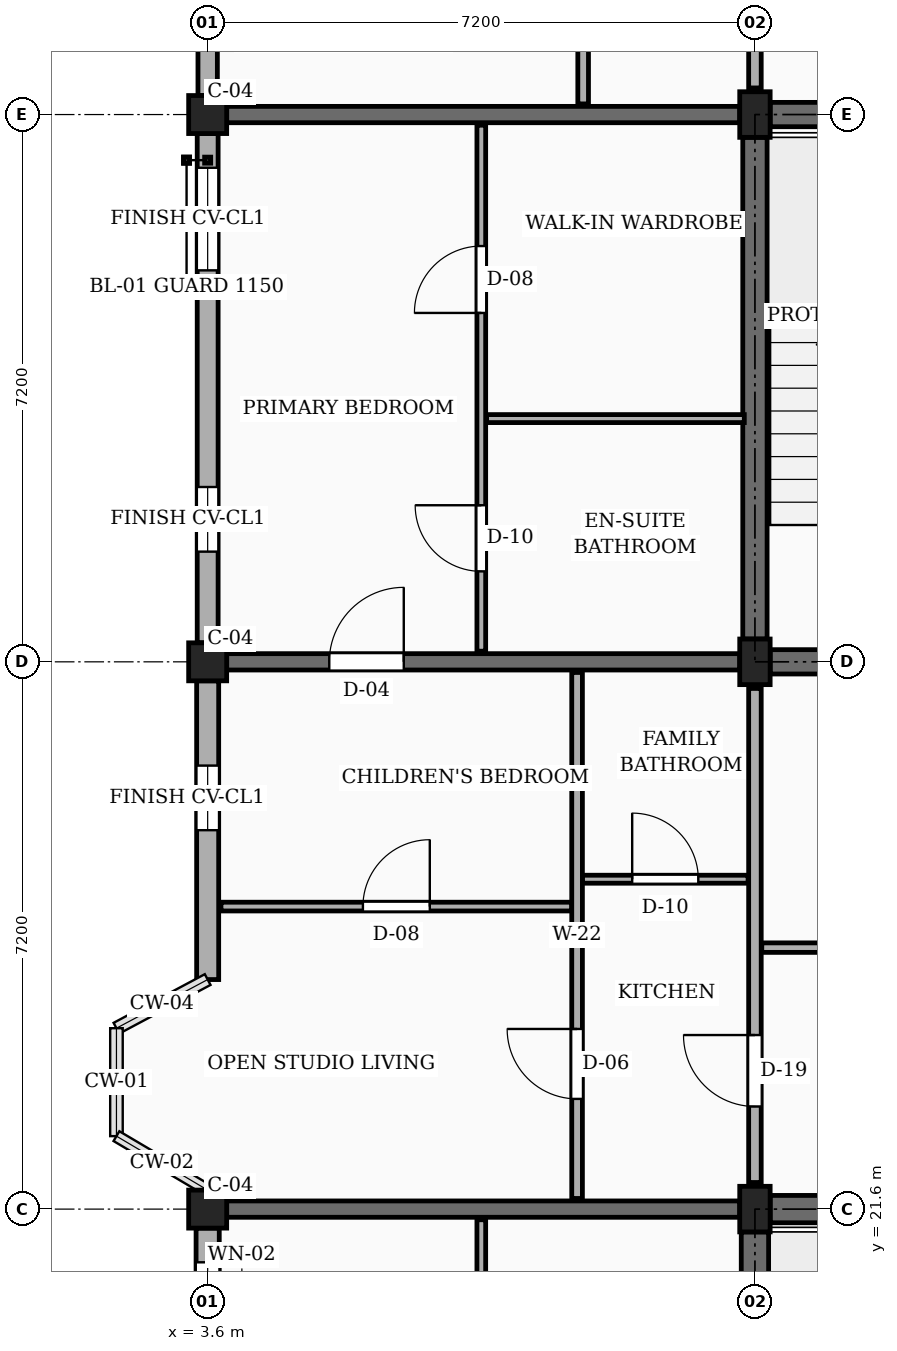
"""IFC4 building model, lengths in metres.
Left out: names, types, materials, properties, quantities, classifications, styles, units other than length and angle.
Written with IfcOpenShell. Run it as: python <this file> out.ifc"""

import sys

from ifc_helpers import new_model, si_unit, direction, frame, frame_2d, origin, origin_2d, place, context, subcontext, project, spatial, rectangle, extrude, element, fill, save


model = new_model("IFC4")
c1 = context("Model", 3, precision=1e-05, world=origin(), true_north=direction((0.0, 1.0)))
c2 = subcontext(c1, "Body", "Model", "MODEL_VIEW")
j1 = project(units=[si_unit("LENGTHUNIT", "METRE"), si_unit("PLANEANGLEUNIT", "RADIAN")], contexts=[c1])
p1 = place(None, origin())
s1 = spatial("IfcSite", under=j1, at=p1, CompositionType="ELEMENT")
p2 = place(p1, origin())
s2 = spatial("IfcBuilding", under=s1, at=p2, CompositionType="ELEMENT")
p3 = place(p2, frame((0.0, 0.0, 26.55)))
s3 = spatial("IfcBuildingStorey", under=s2, at=p3, CompositionType="ELEMENT", Elevation=26.55)
for number, where, z_axis, x_axis in (
    (1, (3.6, 21.6, 0.0), (0.0, 0.0, 1.0), (1.0, 0.0, 0.0)),
    (2, (3.6, 28.8, 0.0), (0.0, 0.0, 1.0), (1.0, 0.0, 0.0)),
    (3, (3.6, 36.0, 0.0), (0.0, 0.0, 1.0), (1.0, 0.0, 0.0)),
):
    element("IfcColumn", number, at=place(p3, frame(where, z_axis=z_axis, x_axis=x_axis)), inside=s3, PredefinedType="COLUMN", context=c2, shape_type="SweptSolid", body=[
        extrude(rectangle(XDim=0.5, YDim=0.5, at=origin_2d()), origin(), (0.0, 0.0, 1.0), 3.15),
    ])
for number, where, z_axis, x_axis in (
    (4, (10.8, 21.6, 0.0), (0.0, 0.0, 1.0), (1.0, 0.0, 0.0)),
    (5, (10.8, 28.8, 0.0), (0.0, 0.0, 1.0), (1.0, 0.0, 0.0)),
    (6, (10.8, 36.0, 0.0), (0.0, 0.0, 1.0), (1.0, 0.0, 0.0)),
):
    element("IfcColumn", number, at=place(p3, frame(where, z_axis=z_axis, x_axis=x_axis)), inside=s3, PredefinedType="COLUMN", context=c2, shape_type="SweptSolid", body=[
        extrude(rectangle(XDim=0.4, YDim=0.6, at=origin_2d()), origin(), (0.0, 0.0, 1.0), 3.15),
    ])
p4 = place(p3, frame((3.85, 21.6, 0.0), z_axis=(0.0, 0.0, 1.0), x_axis=(1.0, 0.0, 0.0)))
e7 = element("IfcWall", 7, at=p4, inside=s3, PredefinedType="SOLIDWALL", context=c2, shape_type="SweptSolid", body=[
    extrude(rectangle(XDim=6.75, YDim=0.215, at=frame_2d((3.375, 0.0))), origin(), (0.0, 0.0, 1.0), 2.17),
])
p5 = place(p3, frame((3.85, 28.8, 0.0), z_axis=(0.0, 0.0, 1.0), x_axis=(1.0, 0.0, 0.0)))
e8 = element("IfcWall", 8, at=p5, inside=s3, PredefinedType="SOLIDWALL", context=c2, shape_type="SweptSolid", body=[
    extrude(rectangle(XDim=6.75, YDim=0.215, at=frame_2d((3.375, 0.0))), origin(), (0.0, 0.0, 1.0), 2.17),
])
p6 = place(p5, frame((1.35, 0.0, 0.0)))
e9 = element("IfcOpeningElement", 9, at=p6, cuts=e8, PredefinedType="OPENING", context=c2, shape_type="SweptSolid", body=[
    extrude(rectangle(XDim=0.98, YDim=2.12, at=frame_2d((0.49, 1.06))), frame((0.0, 0.118, 0.0), z_axis=(0.0, -1.0, 0.0), x_axis=(1.0, 0.0, 0.0)), (0.0, 0.0, 1.0), 0.235),
])
p7 = place(p3, frame((3.85, 36.0, 0.0), z_axis=(0.0, 0.0, 1.0), x_axis=(1.0, 0.0, 0.0)))
e10 = element("IfcWall", 10, at=p7, inside=s3, PredefinedType="SOLIDWALL", context=c2, shape_type="SweptSolid", body=[
    extrude(rectangle(XDim=6.75, YDim=0.215, at=frame_2d((3.375, 0.0))), origin(), (0.0, 0.0, 1.0), 2.17),
])
p8 = place(p3, frame((3.6, 42.95, 0.0), z_axis=(0.0, 0.0, 1.0), x_axis=(0.0, -1.0, 0.0)))
e11 = element("IfcWall", 11, at=p8, inside=s3, PredefinedType="SOLIDWALL", context=c2, shape_type="SweptSolid", body=[
    extrude(rectangle(XDim=6.7, YDim=0.255, at=frame_2d((3.35, 0.0))), origin(), (0.0, 0.0, 1.0), 2.44),
])
p9 = place(p8, frame((0.45, 0.0, 0.78)))
e12 = element("IfcOpeningElement", 12, at=p9, cuts=e11, PredefinedType="OPENING", context=c2, shape_type="SweptSolid", body=[
    extrude(rectangle(XDim=1.15, YDim=1.44, at=frame_2d((0.575, 0.72))), frame((0.0, 0.137, 0.0), z_axis=(0.0, -1.0, 0.0), x_axis=(1.0, 0.0, 0.0)), (0.0, 0.0, 1.0), 0.275),
])
p10 = place(p8, frame((4.65, 0.0, 0.78)))
e13 = element("IfcOpeningElement", 13, at=p10, cuts=e11, PredefinedType="OPENING", context=c2, shape_type="SweptSolid", body=[
    extrude(rectangle(XDim=1.35, YDim=1.44, at=frame_2d((0.675, 0.72))), frame((0.0, 0.137, 0.0), z_axis=(0.0, -1.0, 0.0), x_axis=(1.0, 0.0, 0.0)), (0.0, 0.0, 1.0), 0.275),
])
p11 = place(p3, frame((3.6, 35.75, 0.0), z_axis=(0.0, 0.0, 1.0), x_axis=(0.0, -1.0, 0.0)))
e14 = element("IfcWall", 14, at=p11, inside=s3, PredefinedType="SOLIDWALL", context=c2, shape_type="SweptSolid", body=[
    extrude(rectangle(XDim=6.7, YDim=0.275, at=frame_2d((3.35, 0.0))), origin(), (0.0, 0.0, 1.0), 2.44),
])
p12 = place(p11, frame((0.45, 0.0, 0.78)))
e15 = element("IfcOpeningElement", 15, at=p12, cuts=e14, PredefinedType="OPENING", context=c2, shape_type="SweptSolid", body=[
    extrude(rectangle(XDim=1.35, YDim=1.44, at=frame_2d((0.675, 0.72))), frame((0.0, 0.147, 0.0), z_axis=(0.0, -1.0, 0.0), x_axis=(1.0, 0.0, 0.0)), (0.0, 0.0, 1.0), 0.295),
])
p13 = place(p11, frame((4.65, 0.0, 0.78)))
e16 = element("IfcOpeningElement", 16, at=p13, cuts=e14, PredefinedType="OPENING", context=c2, shape_type="SweptSolid", body=[
    extrude(rectangle(XDim=0.85, YDim=1.15, at=frame_2d((0.425, 0.575))), frame((0.0, 0.147, 0.0), z_axis=(0.0, -1.0, 0.0), x_axis=(1.0, 0.0, 0.0)), (0.0, 0.0, 1.0), 0.295),
])
p14 = place(p3, frame((3.6, 28.55, 0.0), z_axis=(0.0, 0.0, 1.0), x_axis=(0.0, -1.0, 0.0)))
e17 = element("IfcWall", 17, at=p14, inside=s3, PredefinedType="SOLIDWALL", context=c2, shape_type="SweptSolid", body=[
    extrude(rectangle(XDim=3.93, YDim=0.29, at=frame_2d((1.965, 0.0))), origin(), (0.0, 0.0, 1.0), 2.44),
])
p15 = place(p14, frame((1.115, 0.0, 0.78)))
e18 = element("IfcOpeningElement", 18, at=p15, cuts=e17, PredefinedType="OPENING", context=c2, shape_type="SweptSolid", body=[
    extrude(rectangle(XDim=0.85, YDim=1.15, at=frame_2d((0.425, 0.575))), frame((0.0, 0.155, 0.0), z_axis=(0.0, -1.0, 0.0), x_axis=(1.0, 0.0, 0.0)), (0.0, 0.0, 1.0), 0.31),
])
p16 = place(p3, frame((3.6, 21.35, 0.0), z_axis=(0.0, 0.0, 1.0), x_axis=(0.0, -1.0, 0.0)))
e19 = element("IfcWall", 19, at=p16, inside=s3, PredefinedType="SOLIDWALL", context=c2, shape_type="SweptSolid", body=[
    extrude(rectangle(XDim=6.7, YDim=0.305, at=frame_2d((3.35, 0.0))), origin(), (0.0, 0.0, 1.0), 2.44),
])
p17 = place(p16, frame((0.45, 0.0, 0.78)))
e20 = element("IfcOpeningElement", 20, at=p17, cuts=e19, PredefinedType="OPENING", context=c2, shape_type="SweptSolid", body=[
    extrude(rectangle(XDim=0.92, YDim=1.15, at=frame_2d((0.46, 0.575))), frame((0.0, 0.163, 0.0), z_axis=(0.0, -1.0, 0.0), x_axis=(1.0, 0.0, 0.0)), (0.0, 0.0, 1.0), 0.325),
])
p18 = place(p16, frame((4.65, 0.0, 0.78)))
e21 = element("IfcOpeningElement", 21, at=p18, cuts=e19, PredefinedType="OPENING", context=c2, shape_type="SweptSolid", body=[
    extrude(rectangle(XDim=1.08, YDim=1.15, at=frame_2d((0.54, 0.575))), frame((0.0, 0.163, 0.0), z_axis=(0.0, -1.0, 0.0), x_axis=(1.0, 0.0, 0.0)), (0.0, 0.0, 1.0), 0.325),
])
p19 = place(p3, frame((10.8, 14.7, 0.0), z_axis=(0.0, 0.0, 1.0), x_axis=(0.0, 1.0, 0.0)))
e22 = element("IfcWall", 22, at=p19, inside=s3, PredefinedType="SHEAR", context=c2, shape_type="SweptSolid", body=[
    extrude(rectangle(XDim=6.6, YDim=0.36, at=frame_2d((3.3, 0.0))), origin(), (0.0, 0.0, 1.0), 2.87),
])
p20 = place(p3, frame((11.0, 21.6, 0.0), z_axis=(0.0, 0.0, 1.0), x_axis=(1.0, 0.0, 0.0)))
e23 = element("IfcWall", 23, at=p20, inside=s3, PredefinedType="SHEAR", context=c2, shape_type="SweptSolid", body=[
    extrude(rectangle(XDim=6.8, YDim=0.36, at=frame_2d((3.4, 0.0))), origin(), (0.0, 0.0, 1.0), 2.87),
])
p21 = place(p3, frame((10.8, 29.1, 0.0), z_axis=(0.0, 0.0, 1.0), x_axis=(0.0, 1.0, 0.0)))
e24 = element("IfcWall", 24, at=p21, inside=s3, PredefinedType="SHEAR", context=c2, shape_type="SweptSolid", body=[
    extrude(rectangle(XDim=6.6, YDim=0.32, at=frame_2d((3.3, 0.0))), origin(), (0.0, 0.0, 1.0), 2.87),
])
for number, where, z_axis, x_axis in (
    (25, (11.0, 36.0, 0.0), (0.0, 0.0, 1.0), (1.0, 0.0, 0.0)),
    (26, (11.0, 28.8, 0.0), (0.0, 0.0, 1.0), (1.0, 0.0, 0.0)),
):
    element("IfcWall", number, at=place(p3, frame(where, z_axis=z_axis, x_axis=x_axis)), inside=s3, PredefinedType="SHEAR", context=c2, shape_type="SweptSolid", body=[
        extrude(rectangle(XDim=6.8, YDim=0.32, at=frame_2d((3.4, 0.0))), origin(), (0.0, 0.0, 1.0), 2.87),
    ])
p22 = place(p3, frame((10.8, 21.95, 0.0), z_axis=(0.0, 0.0, 1.0), x_axis=(0.0, 1.0, 0.0)))
e27 = element("IfcWall", 27, at=p22, inside=s3, PredefinedType="PARTITIONING", context=c2, shape_type="SweptSolid", body=[
    extrude(rectangle(XDim=6.5, YDim=0.165, at=frame_2d((3.25, 0.0))), origin(), (0.0, 0.0, 1.0), 2.305),
])
p23 = place(p22, frame((1.0, 0.0, 0.0)))
e28 = element("IfcOpeningElement", 28, at=p23, cuts=e27, PredefinedType="OPENING", context=c2, shape_type="SweptSolid", body=[
    extrude(rectangle(XDim=0.94, YDim=2.12, at=frame_2d((0.47, 1.06))), frame((0.0, 0.093, 0.0), z_axis=(0.0, -1.0, 0.0), x_axis=(1.0, 0.0, 0.0)), (0.0, 0.0, 1.0), 0.185),
])
p24 = place(p3, frame((10.8, 36.35, 0.0), z_axis=(0.0, 0.0, 1.0), x_axis=(0.0, 1.0, 0.0)))
e29 = element("IfcWall", 29, at=p24, inside=s3, PredefinedType="PARTITIONING", context=c2, shape_type="SweptSolid", body=[
    extrude(rectangle(XDim=6.5, YDim=0.165, at=frame_2d((3.25, 0.0))), origin(), (0.0, 0.0, 1.0), 2.305),
])
p25 = place(p24, frame((1.0, 0.0, 0.0)))
e30 = element("IfcOpeningElement", 30, at=p25, cuts=e29, PredefinedType="OPENING", context=c2, shape_type="SweptSolid", body=[
    extrude(rectangle(XDim=1.14, YDim=2.18, at=frame_2d((0.57, 1.09))), frame((0.0, 0.093, 0.0), z_axis=(0.0, -1.0, 0.0), x_axis=(1.0, 0.0, 0.0)), (0.0, 0.0, 1.0), 0.185),
])
p26 = place(p3, frame((7.2, 14.54, 0.0), z_axis=(0.0, 0.0, 1.0), x_axis=(0.0, 1.0, 0.0)))
e31 = element("IfcWall", 31, at=p26, inside=s3, PredefinedType="PARTITIONING", context=c2, shape_type="SweptSolid", body=[
    extrude(rectangle(XDim=6.92, YDim=0.115, at=frame_2d((3.46, 0.0))), origin(), (0.0, 0.0, 1.0), 2.305),
])
p27 = place(p26, frame((1.05, 0.0, 0.0)))
e32 = element("IfcOpeningElement", 32, at=p27, cuts=e31, PredefinedType="OPENING", context=c2, shape_type="SweptSolid", body=[
    extrude(rectangle(XDim=0.87, YDim=2.05, at=frame_2d((0.435, 1.025))), frame((0.0, 0.067, 0.0), z_axis=(0.0, -1.0, 0.0), x_axis=(1.0, 0.0, 0.0)), (0.0, 0.0, 1.0), 0.135),
])
p28 = place(p26, frame((4.45, 0.0, 0.0)))
e33 = element("IfcOpeningElement", 33, at=p28, cuts=e31, PredefinedType="OPENING", context=c2, shape_type="SweptSolid", body=[
    extrude(rectangle(XDim=0.88, YDim=2.08, at=frame_2d((0.44, 1.04))), frame((0.0, 0.067, 0.0), z_axis=(0.0, -1.0, 0.0), x_axis=(1.0, 0.0, 0.0)), (0.0, 0.0, 1.0), 0.135),
])
p29 = place(p3, frame((10.89, 25.04, 0.0), z_axis=(0.0, 0.0, 1.0), x_axis=(1.0, 0.0, 0.0)))
e34 = element("IfcWall", 34, at=p29, inside=s3, PredefinedType="PARTITIONING", context=c2, shape_type="SweptSolid", body=[
    extrude(rectangle(XDim=7.02, YDim=0.125, at=frame_2d((3.51, 0.0))), origin(), (0.0, 0.0, 1.0), 2.305),
])
p30 = place(p29, frame((2.85, 0.0, 0.0)))
e35 = element("IfcOpeningElement", 35, at=p30, cuts=e34, PredefinedType="OPENING", context=c2, shape_type="SweptSolid", body=[
    extrude(rectangle(XDim=1.02, YDim=2.15, at=frame_2d((0.51, 1.075))), frame((0.0, 0.073, 0.0), z_axis=(0.0, -1.0, 0.0), x_axis=(1.0, 0.0, 0.0)), (0.0, 0.0, 1.0), 0.145),
])
p31 = place(p3, frame((3.775, 25.58, 0.0), z_axis=(0.0, 0.0, 1.0), x_axis=(1.0, 0.0, 0.0)))
e36 = element("IfcWall", 36, at=p31, inside=s3, PredefinedType="PARTITIONING", context=c2, shape_type="SweptSolid", body=[
    extrude(rectangle(XDim=4.615, YDim=0.115, at=frame_2d((2.308, 0.0))), origin(), (0.0, 0.0, 1.0), 2.305),
])
p32 = place(p31, frame((1.867, 0.0, 0.0)))
e37 = element("IfcOpeningElement", 37, at=p32, cuts=e36, PredefinedType="OPENING", context=c2, shape_type="SweptSolid", body=[
    extrude(rectangle(XDim=0.88, YDim=2.08, at=frame_2d((0.44, 1.04))), frame((0.0, 0.067, 0.0), z_axis=(0.0, -1.0, 0.0), x_axis=(1.0, 0.0, 0.0)), (0.0, 0.0, 1.0), 0.135),
])
p33 = place(p3, frame((8.53, 25.94, 0.0), z_axis=(0.0, 0.0, 1.0), x_axis=(1.0, 0.0, 0.0)))
e38 = element("IfcWall", 38, at=p33, inside=s3, PredefinedType="PARTITIONING", context=c2, shape_type="SweptSolid", body=[
    extrude(rectangle(XDim=2.18, YDim=0.105, at=frame_2d((1.09, 0.0))), origin(), (0.0, 0.0, 1.0), 2.305),
])
p34 = place(p33, frame((0.655, 0.0, 0.0)))
e39 = element("IfcOpeningElement", 39, at=p34, cuts=e38, PredefinedType="OPENING", context=c2, shape_type="SweptSolid", body=[
    extrude(rectangle(XDim=0.87, YDim=2.05, at=frame_2d((0.435, 1.025))), frame((0.0, 0.062, 0.0), z_axis=(0.0, -1.0, 0.0), x_axis=(1.0, 0.0, 0.0)), (0.0, 0.0, 1.0), 0.125),
])
p35 = place(p3, frame((8.46, 21.74, 0.0), z_axis=(0.0, 0.0, 1.0), x_axis=(0.0, 1.0, 0.0)))
e40 = element("IfcWall", 40, at=p35, inside=s3, PredefinedType="PARTITIONING", context=c2, shape_type="SweptSolid", body=[
    extrude(rectangle(XDim=6.92, YDim=0.14, at=frame_2d((3.46, 0.0))), origin(), (0.0, 0.0, 1.0), 2.305),
])
p36 = place(p35, frame((1.31, 0.0, 0.0)))
e41 = element("IfcOpeningElement", 41, at=p36, cuts=e40, PredefinedType="OPENING", context=c2, shape_type="SweptSolid", body=[
    extrude(rectangle(XDim=0.92, YDim=2.1, at=frame_2d((0.46, 1.05))), frame((0.0, 0.08, 0.0), z_axis=(0.0, -1.0, 0.0), x_axis=(1.0, 0.0, 0.0)), (0.0, 0.0, 1.0), 0.16),
])
p37 = place(p3, frame((7.2, 28.94, 0.0), z_axis=(0.0, 0.0, 1.0), x_axis=(0.0, 1.0, 0.0)))
e42 = element("IfcWall", 42, at=p37, inside=s3, PredefinedType="PARTITIONING", context=c2, shape_type="SweptSolid", body=[
    extrude(rectangle(XDim=6.92, YDim=0.115, at=frame_2d((3.46, 0.0))), origin(), (0.0, 0.0, 1.0), 2.305),
])
p38 = place(p37, frame((1.05, 0.0, 0.0)))
e43 = element("IfcOpeningElement", 43, at=p38, cuts=e42, PredefinedType="OPENING", context=c2, shape_type="SweptSolid", body=[
    extrude(rectangle(XDim=0.87, YDim=2.05, at=frame_2d((0.435, 1.025))), frame((0.0, 0.067, 0.0), z_axis=(0.0, -1.0, 0.0), x_axis=(1.0, 0.0, 0.0)), (0.0, 0.0, 1.0), 0.135),
])
p39 = place(p37, frame((4.45, 0.0, 0.0)))
e44 = element("IfcOpeningElement", 44, at=p39, cuts=e42, PredefinedType="OPENING", context=c2, shape_type="SweptSolid", body=[
    extrude(rectangle(XDim=0.88, YDim=2.08, at=frame_2d((0.44, 1.04))), frame((0.0, 0.067, 0.0), z_axis=(0.0, -1.0, 0.0), x_axis=(1.0, 0.0, 0.0)), (0.0, 0.0, 1.0), 0.135),
])
p40 = place(p3, frame((7.27, 32.0, 0.0), z_axis=(0.0, 0.0, 1.0), x_axis=(1.0, 0.0, 0.0)))
e45 = element("IfcWall", 45, at=p40, inside=s3, PredefinedType="PARTITIONING", context=c2, shape_type="SweptSolid", body=[
    extrude(rectangle(XDim=3.39, YDim=0.105, at=frame_2d((1.695, 0.0))), origin(), (0.0, 0.0, 1.0), 2.305),
])
p41 = place(p3, frame((8.54, 36.14, 0.0), z_axis=(0.0, 0.0, 1.0), x_axis=(0.0, 1.0, 0.0)))
e46 = element("IfcWall", 46, at=p41, inside=s3, PredefinedType="PARTITIONING", context=c2, shape_type="SweptSolid", body=[
    extrude(rectangle(XDim=6.885, YDim=0.14, at=frame_2d((3.442, 0.0))), origin(), (0.0, 0.0, 1.0), 2.305),
])
p42 = place(p41, frame((1.31, 0.0, 0.0)))
e47 = element("IfcOpeningElement", 47, at=p42, cuts=e46, PredefinedType="OPENING", context=c2, shape_type="SweptSolid", body=[
    extrude(rectangle(XDim=0.95, YDim=2.1, at=frame_2d((0.475, 1.05))), frame((0.0, 0.08, 0.0), z_axis=(0.0, -1.0, 0.0), x_axis=(1.0, 0.0, 0.0)), (0.0, 0.0, 1.0), 0.16),
])
p43 = place(p12, origin())
e48 = element("IfcWindow", 48, at=p43, inside=s3, PartitioningType="SINGLE_PANEL", PredefinedType="WINDOW", context=c2, shape_type="SweptSolid", body=[
    extrude(rectangle(XDim=1.35, YDim=1.44, at=frame_2d((0.675, 0.72))), frame((0.0, 0.03, 0.0), z_axis=(0.0, -1.0, 0.0), x_axis=(1.0, 0.0, 0.0)), (0.0, 0.0, 1.0), 0.06),
])
fill(e15, e48)
p44 = place(p13, origin())
e49 = element("IfcWindow", 49, at=p44, inside=s3, PartitioningType="SINGLE_PANEL", PredefinedType="WINDOW", context=c2, shape_type="SweptSolid", body=[
    extrude(rectangle(XDim=0.85, YDim=1.15, at=frame_2d((0.425, 0.575))), frame((0.0, 0.03, 0.0), z_axis=(0.0, -1.0, 0.0), x_axis=(1.0, 0.0, 0.0)), (0.0, 0.0, 1.0), 0.06),
])
fill(e16, e49)
p45 = place(p15, origin())
e50 = element("IfcWindow", 50, at=p45, inside=s3, PartitioningType="SINGLE_PANEL", PredefinedType="WINDOW", context=c2, shape_type="SweptSolid", body=[
    extrude(rectangle(XDim=0.85, YDim=1.15, at=frame_2d((0.425, 0.575))), frame((0.0, 0.03, 0.0), z_axis=(0.0, -1.0, 0.0), x_axis=(1.0, 0.0, 0.0)), (0.0, 0.0, 1.0), 0.06),
])
fill(e18, e50)
p46 = place(p17, origin())
e51 = element("IfcWindow", 51, at=p46, inside=s3, PartitioningType="SINGLE_PANEL", PredefinedType="WINDOW", context=c2, shape_type="SweptSolid", body=[
    extrude(rectangle(XDim=0.92, YDim=1.15, at=frame_2d((0.46, 0.575))), frame((0.0, 0.03, 0.0), z_axis=(0.0, -1.0, 0.0), x_axis=(1.0, 0.0, 0.0)), (0.0, 0.0, 1.0), 0.06),
])
fill(e20, e51)
p47 = place(p23, origin())
e52 = element("IfcDoor", 52, at=p47, inside=s3, OperationType="SINGLE_SWING_RIGHT", PredefinedType="DOOR", context=c2, shape_type="SweptSolid", body=[
    extrude(rectangle(XDim=0.94, YDim=2.12, at=frame_2d((0.47, 1.06))), frame((0.0, 0.025, 0.0), z_axis=(0.0, -1.0, 0.0), x_axis=(1.0, 0.0, 0.0)), (0.0, 0.0, 1.0), 0.05),
])
fill(e28, e52)
p48 = place(p32, origin())
e53 = element("IfcDoor", 53, at=p48, inside=s3, OperationType="SINGLE_SWING_RIGHT", PredefinedType="DOOR", context=c2, shape_type="SweptSolid", body=[
    extrude(rectangle(XDim=0.88, YDim=2.08, at=frame_2d((0.44, 1.04))), frame((0.0, 0.025, 0.0), z_axis=(0.0, -1.0, 0.0), x_axis=(1.0, 0.0, 0.0)), (0.0, 0.0, 1.0), 0.05),
])
fill(e37, e53)
p49 = place(p34, origin())
e54 = element("IfcDoor", 54, at=p49, inside=s3, OperationType="SINGLE_SWING_LEFT", PredefinedType="DOOR", context=c2, shape_type="SweptSolid", body=[
    extrude(rectangle(XDim=0.87, YDim=2.05, at=frame_2d((0.435, 1.025))), frame((0.0, 0.025, 0.0), z_axis=(0.0, -1.0, 0.0), x_axis=(1.0, 0.0, 0.0)), (0.0, 0.0, 1.0), 0.05),
])
fill(e39, e54)
p50 = place(p36, origin())
e55 = element("IfcDoor", 55, at=p50, inside=s3, OperationType="SINGLE_SWING_RIGHT", PredefinedType="DOOR", context=c2, shape_type="SweptSolid", body=[
    extrude(rectangle(XDim=0.92, YDim=2.1, at=frame_2d((0.46, 1.05))), frame((0.0, 0.025, 0.0), z_axis=(0.0, -1.0, 0.0), x_axis=(1.0, 0.0, 0.0)), (0.0, 0.0, 1.0), 0.05),
])
fill(e41, e55)
p51 = place(p38, origin())
e56 = element("IfcDoor", 56, at=p51, inside=s3, OperationType="SINGLE_SWING_RIGHT", PredefinedType="DOOR", context=c2, shape_type="SweptSolid", body=[
    extrude(rectangle(XDim=0.87, YDim=2.05, at=frame_2d((0.435, 1.025))), frame((0.0, 0.025, 0.0), z_axis=(0.0, -1.0, 0.0), x_axis=(1.0, 0.0, 0.0)), (0.0, 0.0, 1.0), 0.05),
])
fill(e43, e56)
p52 = place(p39, origin())
e57 = element("IfcDoor", 57, at=p52, inside=s3, OperationType="SINGLE_SWING_LEFT", PredefinedType="DOOR", context=c2, shape_type="SweptSolid", body=[
    extrude(rectangle(XDim=0.88, YDim=2.08, at=frame_2d((0.44, 1.04))), frame((0.0, 0.025, 0.0), z_axis=(0.0, -1.0, 0.0), x_axis=(1.0, 0.0, 0.0)), (0.0, 0.0, 1.0), 0.05),
])
fill(e44, e57)
p53 = place(p6, origin())
e58 = element("IfcDoor", 58, at=p53, inside=s3, OperationType="SINGLE_SWING_RIGHT", PredefinedType="DOOR", context=c2, shape_type="SweptSolid", body=[
    extrude(rectangle(XDim=0.98, YDim=2.12, at=frame_2d((0.49, 1.06))), frame((0.0, 0.025, 0.0), z_axis=(0.0, -1.0, 0.0), x_axis=(1.0, 0.0, 0.0)), (0.0, 0.0, 1.0), 0.05),
])
fill(e9, e58)
save(model, sys.argv[1])
